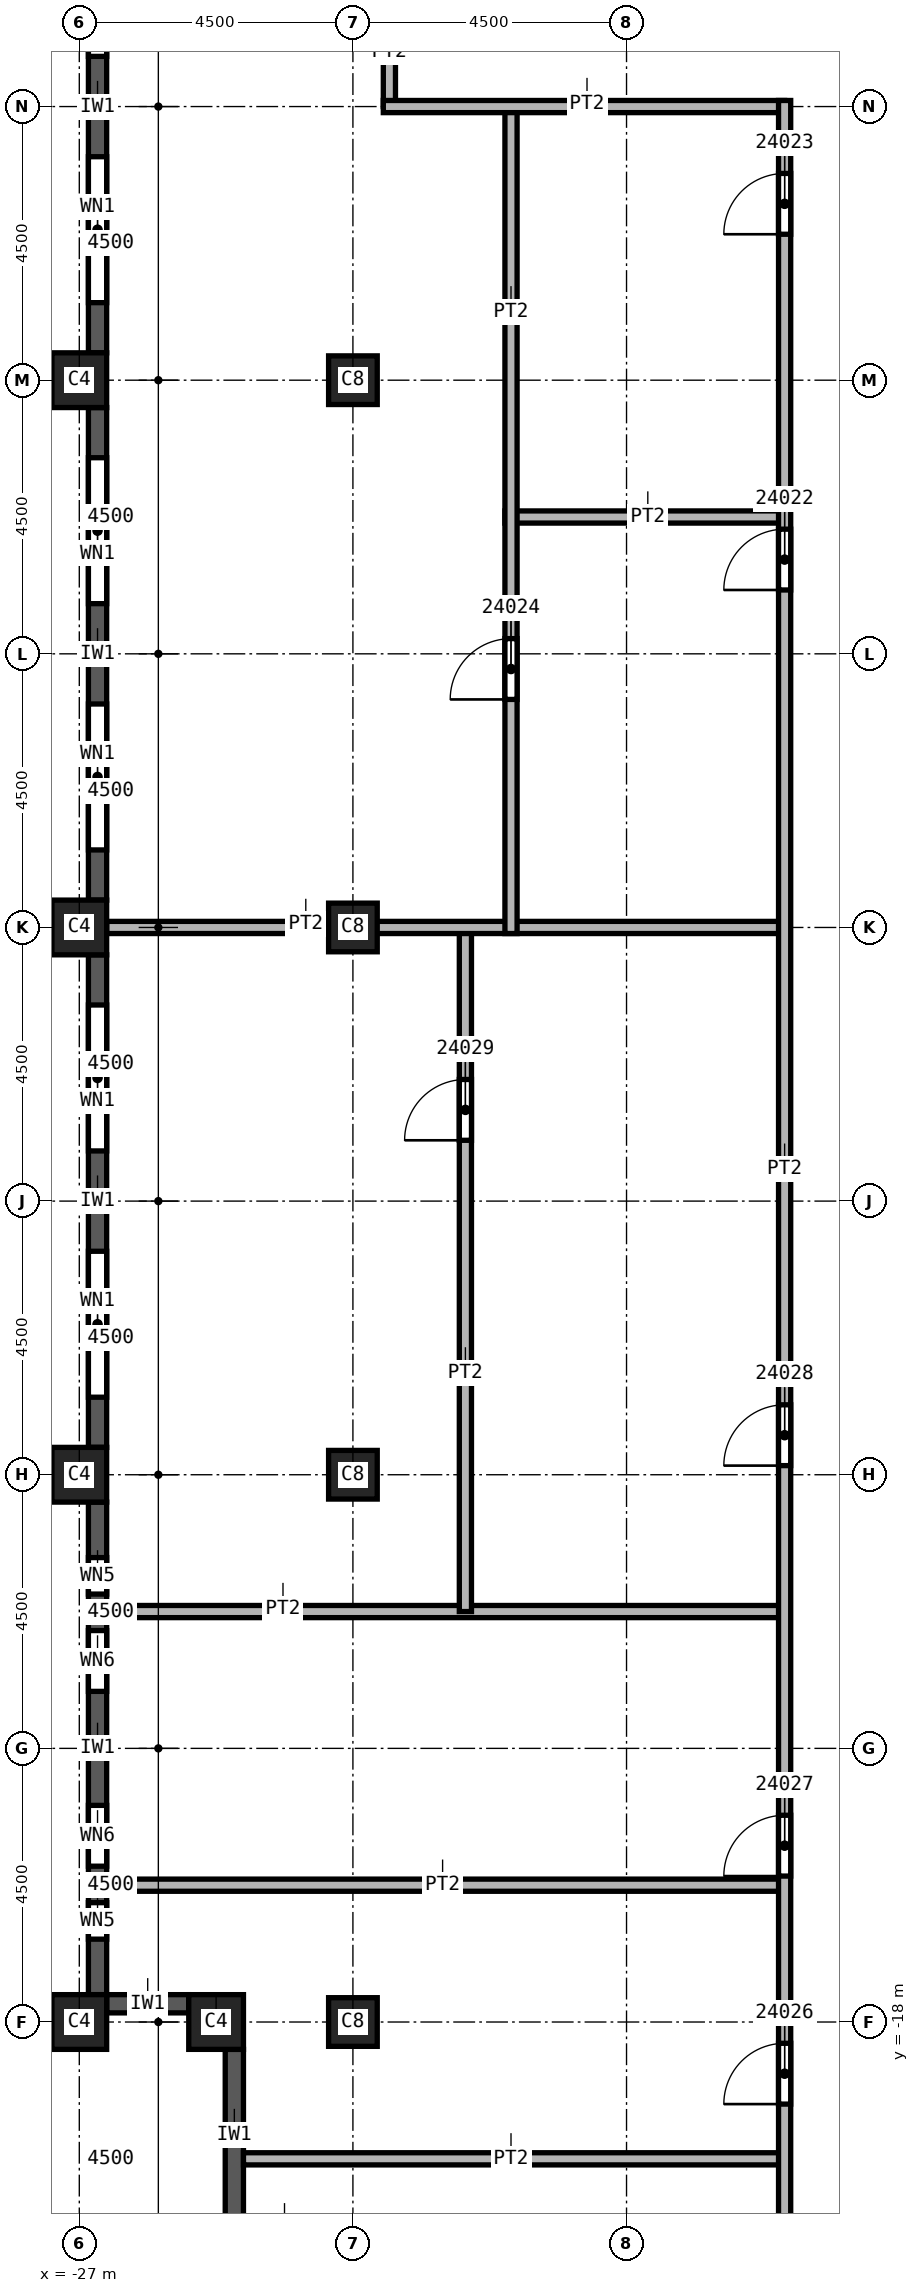
"""IFC4 building model, lengths in metres.
Left out: names, types, materials, properties, quantities, classifications, styles, units other than length and angle.
Written with IfcOpenShell. Run it as: python <this file> out.ifc"""

import sys

from ifc_helpers import new_model, si_unit, direction, frame, frame_2d, origin, origin_2d, place, context, subcontext, project, spatial, rectangle, extrude, element, fill, save


model = new_model("IFC4")
c1 = context("Model", 3, precision=1e-05, world=origin(), true_north=direction((0.0, 1.0)))
c2 = subcontext(c1, "Body", "Model", "MODEL_VIEW")
j1 = project(units=[si_unit("LENGTHUNIT", "METRE"), si_unit("PLANEANGLEUNIT", "RADIAN")], contexts=[c1])
p1 = place(None, origin())
s1 = spatial("IfcSite", under=j1, at=p1, CompositionType="ELEMENT")
p2 = place(p1, origin())
s2 = spatial("IfcBuilding", under=s1, at=p2, CompositionType="ELEMENT")
p3 = place(p2, frame((0.0, 0.0, 342.0)))
s3 = spatial("IfcBuildingStorey", under=s2, at=p3, CompositionType="ELEMENT", Elevation=342.0)
for number, where, z_axis, x_axis in (
    (1, (-22.5, 0.0, 0.0), (0.0, 0.0, 1.0), (1.0, 0.0, 0.0)),
    (2, (-22.5, 9.0, 0.0), (0.0, 0.0, 1.0), (1.0, 0.0, 0.0)),
    (3, (-22.5, -9.0, 0.0), (0.0, 0.0, 1.0), (1.0, 0.0, 0.0)),
    (4, (-22.5, -18.0, 0.0), (0.0, 0.0, 1.0), (1.0, 0.0, 0.0)),
):
    element("IfcColumn", number, at=place(p3, frame(where, z_axis=z_axis, x_axis=x_axis)), inside=s3, PredefinedType="COLUMN", context=c2, shape_type="SweptSolid", body=[
        extrude(rectangle(XDim=0.8, YDim=0.8, at=origin_2d()), origin(), (0.0, 0.0, 1.0), 3.74),
    ])
for number, where, z_axis, x_axis in (
    (5, (-27.0, 0.0, 0.0), (0.0, 0.0, 1.0), (0.0, 1.0, 0.0)),
    (6, (-27.0, 9.0, 0.0), (0.0, 0.0, 1.0), (0.0, 1.0, 0.0)),
    (7, (-27.0, -9.0, 0.0), (0.0, 0.0, 1.0), (0.0, 1.0, 0.0)),
    (8, (-27.0, -18.0, 0.0), (0.0, 0.0, 1.0), (0.0, 1.0, 0.0)),
    (9, (-24.75, -18.0, 0.0), (0.0, 0.0, 1.0), (1.0, 0.0, 0.0)),
):
    element("IfcColumn", number, at=place(p3, frame(where, z_axis=z_axis, x_axis=x_axis)), inside=s3, PredefinedType="COLUMN", context=c2, shape_type="SweptSolid", body=[
        extrude(rectangle(XDim=0.9, YDim=0.9, at=origin_2d()), origin(), (0.0, 0.0, 1.0), 3.74),
    ])
p4 = place(p3, frame((-26.7, 17.55, 0.0), z_axis=(0.0, 0.0, 1.0), x_axis=(0.0, -1.0, 0.0)))
e10 = element("IfcWall", 10, at=p4, inside=s3, PredefinedType="SOLIDWALL", context=c2, shape_type="SweptSolid", body=[
    extrude(rectangle(XDim=8.1, YDim=0.3, at=frame_2d((4.05, 0.0))), origin(), (0.0, 0.0, 1.0), 3.14),
])
p5 = place(p4, frame((0.825, 0.0, 0.8)))
e11 = element("IfcOpeningElement", 11, at=p5, cuts=e10, PredefinedType="OPENING", context=c2, shape_type="SweptSolid", body=[
    extrude(rectangle(XDim=2.4, YDim=1.95, at=frame_2d((1.2, 0.975))), frame((0.0, 0.15, 0.0), z_axis=(0.0, -1.0, 0.0), x_axis=(1.0, 0.0, 0.0)), (0.0, 0.0, 1.0), 0.3),
])
p6 = place(p4, frame((4.875, 0.0, 0.8)))
e12 = element("IfcOpeningElement", 12, at=p6, cuts=e10, PredefinedType="OPENING", context=c2, shape_type="SweptSolid", body=[
    extrude(rectangle(XDim=2.4, YDim=1.95, at=frame_2d((1.2, 0.975))), frame((0.0, 0.15, 0.0), z_axis=(0.0, -1.0, 0.0), x_axis=(1.0, 0.0, 0.0)), (0.0, 0.0, 1.0), 0.3),
])
p7 = place(p3, frame((-26.7, 8.55, 0.0), z_axis=(0.0, 0.0, 1.0), x_axis=(0.0, -1.0, 0.0)))
e13 = element("IfcWall", 13, at=p7, inside=s3, PredefinedType="SOLIDWALL", context=c2, shape_type="SweptSolid", body=[
    extrude(rectangle(XDim=8.1, YDim=0.3, at=frame_2d((4.05, 0.0))), origin(), (0.0, 0.0, 1.0), 3.14),
])
p8 = place(p7, frame((0.825, 0.0, 0.8)))
e14 = element("IfcOpeningElement", 14, at=p8, cuts=e13, PredefinedType="OPENING", context=c2, shape_type="SweptSolid", body=[
    extrude(rectangle(XDim=2.4, YDim=1.95, at=frame_2d((1.2, 0.975))), frame((0.0, 0.15, 0.0), z_axis=(0.0, -1.0, 0.0), x_axis=(1.0, 0.0, 0.0)), (0.0, 0.0, 1.0), 0.3),
])
p9 = place(p7, frame((4.875, 0.0, 0.8)))
e15 = element("IfcOpeningElement", 15, at=p9, cuts=e13, PredefinedType="OPENING", context=c2, shape_type="SweptSolid", body=[
    extrude(rectangle(XDim=2.4, YDim=1.95, at=frame_2d((1.2, 0.975))), frame((0.0, 0.15, 0.0), z_axis=(0.0, -1.0, 0.0), x_axis=(1.0, 0.0, 0.0)), (0.0, 0.0, 1.0), 0.3),
])
p10 = place(p3, frame((-26.7, -0.45, 0.0), z_axis=(0.0, 0.0, 1.0), x_axis=(0.0, -1.0, 0.0)))
e16 = element("IfcWall", 16, at=p10, inside=s3, PredefinedType="SOLIDWALL", context=c2, shape_type="SweptSolid", body=[
    extrude(rectangle(XDim=8.1, YDim=0.3, at=frame_2d((4.05, 0.0))), origin(), (0.0, 0.0, 1.0), 3.14),
])
p11 = place(p10, frame((0.825, 0.0, 0.8)))
e17 = element("IfcOpeningElement", 17, at=p11, cuts=e16, PredefinedType="OPENING", context=c2, shape_type="SweptSolid", body=[
    extrude(rectangle(XDim=2.4, YDim=1.95, at=frame_2d((1.2, 0.975))), frame((0.0, 0.15, 0.0), z_axis=(0.0, -1.0, 0.0), x_axis=(1.0, 0.0, 0.0)), (0.0, 0.0, 1.0), 0.3),
])
p12 = place(p10, frame((4.875, 0.0, 0.8)))
e18 = element("IfcOpeningElement", 18, at=p12, cuts=e16, PredefinedType="OPENING", context=c2, shape_type="SweptSolid", body=[
    extrude(rectangle(XDim=2.4, YDim=1.95, at=frame_2d((1.2, 0.975))), frame((0.0, 0.15, 0.0), z_axis=(0.0, -1.0, 0.0), x_axis=(1.0, 0.0, 0.0)), (0.0, 0.0, 1.0), 0.3),
])
p13 = place(p3, frame((-26.7, -9.45, 0.0), z_axis=(0.0, 0.0, 1.0), x_axis=(0.0, -1.0, 0.0)))
e19 = element("IfcWall", 19, at=p13, inside=s3, PredefinedType="SOLIDWALL", context=c2, shape_type="SweptSolid", body=[
    extrude(rectangle(XDim=8.1, YDim=0.3, at=frame_2d((4.05, 0.0))), origin(), (0.0, 0.0, 1.0), 3.14),
])
p14 = place(p13, frame((0.913, 0.0, 0.8)))
e20 = element("IfcOpeningElement", 20, at=p14, cuts=e19, PredefinedType="OPENING", context=c2, shape_type="SweptSolid", body=[
    extrude(rectangle(XDim=0.6, YDim=1.95, at=frame_2d((0.3, 0.975))), frame((0.0, 0.15, 0.0), z_axis=(0.0, -1.0, 0.0), x_axis=(1.0, 0.0, 0.0)), (0.0, 0.0, 1.0), 0.3),
])
p15 = place(p13, frame((2.113, 0.0, 0.8)))
e21 = element("IfcOpeningElement", 21, at=p15, cuts=e19, PredefinedType="OPENING", context=c2, shape_type="SweptSolid", body=[
    extrude(rectangle(XDim=1.0, YDim=1.95, at=frame_2d((0.5, 0.975))), frame((0.0, 0.15, 0.0), z_axis=(0.0, -1.0, 0.0), x_axis=(1.0, 0.0, 0.0)), (0.0, 0.0, 1.0), 0.3),
])
p16 = place(p13, frame((4.988, 0.0, 0.8)))
e22 = element("IfcOpeningElement", 22, at=p16, cuts=e19, PredefinedType="OPENING", context=c2, shape_type="SweptSolid", body=[
    extrude(rectangle(XDim=1.0, YDim=1.95, at=frame_2d((0.5, 0.975))), frame((0.0, 0.15, 0.0), z_axis=(0.0, -1.0, 0.0), x_axis=(1.0, 0.0, 0.0)), (0.0, 0.0, 1.0), 0.3),
])
p17 = place(p13, frame((6.587, 0.0, 0.8)))
e23 = element("IfcOpeningElement", 23, at=p17, cuts=e19, PredefinedType="OPENING", context=c2, shape_type="SweptSolid", body=[
    extrude(rectangle(XDim=0.6, YDim=1.95, at=frame_2d((0.3, 0.975))), frame((0.0, 0.15, 0.0), z_axis=(0.0, -1.0, 0.0), x_axis=(1.0, 0.0, 0.0)), (0.0, 0.0, 1.0), 0.3),
])
p18 = place(p3, frame((-26.55, -17.7, 0.0), z_axis=(0.0, 0.0, 1.0), x_axis=(1.0, 0.0, 0.0)))
e24 = element("IfcWall", 24, at=p18, inside=s3, PredefinedType="SOLIDWALL", context=c2, shape_type="SweptSolid", body=[
    extrude(rectangle(XDim=1.35, YDim=0.3, at=frame_2d((0.675, 0.0))), origin(), (0.0, 0.0, 1.0), 3.14),
])
p19 = place(p3, frame((-24.45, -18.45, 0.0), z_axis=(0.0, 0.0, 1.0), x_axis=(0.0, -1.0, 0.0)))
e25 = element("IfcWall", 25, at=p19, inside=s3, PredefinedType="SOLIDWALL", context=c2, shape_type="SweptSolid", body=[
    extrude(rectangle(XDim=2.8, YDim=0.3, at=frame_2d((1.4, 0.0))), origin(), (0.0, 0.0, 1.0), 3.14),
])
for number, where, z_axis, x_axis in (
    (26, (-26.55, -15.75, 0.0), (0.0, 0.0, 1.0), (1.0, 0.0, 0.0)),
    (27, (-26.55, -11.25, 0.0), (0.0, 0.0, 1.0), (1.0, 0.0, 0.0)),
):
    element("IfcWall", number, at=place(p3, frame(where, z_axis=z_axis, x_axis=x_axis)), inside=s3, PredefinedType="PARTITIONING", context=c2, shape_type="SweptSolid", body=[
        extrude(rectangle(XDim=11.15, YDim=0.2, at=frame_2d((5.575, 0.0))), origin(), (0.0, 0.0, 1.0), 3.74),
    ])
p20 = place(p3, frame((-24.3, -20.25, 0.0), z_axis=(0.0, 0.0, 1.0), x_axis=(1.0, 0.0, 0.0)))
e28 = element("IfcWall", 28, at=p20, inside=s3, PredefinedType="PARTITIONING", context=c2, shape_type="SweptSolid", body=[
    extrude(rectangle(XDim=8.9, YDim=0.2, at=frame_2d((4.45, 0.0))), origin(), (0.0, 0.0, 1.0), 3.74),
])
p21 = place(p3, frame((-21.9, 13.5, 0.0), z_axis=(0.0, 0.0, 1.0), x_axis=(0.0, 1.0, 0.0)))
e29 = element("IfcWall", 29, at=p21, inside=s3, PredefinedType="PARTITIONING", context=c2, shape_type="SweptSolid", body=[
    extrude(rectangle(XDim=1.7, YDim=0.2, at=frame_2d((0.85, 0.0))), origin(), (0.0, 0.0, 1.0), 3.74),
])
p22 = place(p3, frame((-20.65, -11.25, 0.0), z_axis=(0.0, 0.0, 1.0), x_axis=(0.0, 1.0, 0.0)))
e30 = element("IfcWall", 30, at=p22, inside=s3, PredefinedType="PARTITIONING", context=c2, shape_type="SweptSolid", body=[
    extrude(rectangle(XDim=11.25, YDim=0.2, at=frame_2d((5.625, 0.0))), origin(), (0.0, 0.0, 1.0), 3.74),
])
p23 = place(p22, frame((7.75, 0.0, 0.0)))
e31 = element("IfcOpeningElement", 31, at=p23, cuts=e30, PredefinedType="OPENING", context=c2, shape_type="SweptSolid", body=[
    extrude(rectangle(XDim=1.0, YDim=2.1, at=frame_2d((0.5, 1.05))), frame((0.0, 0.1, 0.0), z_axis=(0.0, -1.0, 0.0), x_axis=(1.0, 0.0, 0.0)), (0.0, 0.0, 1.0), 0.2),
])
p24 = place(p3, frame((-15.4, 0.0, 0.0), z_axis=(0.0, 0.0, 1.0), x_axis=(-1.0, 0.0, 0.0)))
e32 = element("IfcWall", 32, at=p24, inside=s3, PredefinedType="PARTITIONING", context=c2, shape_type="SweptSolid", body=[
    extrude(rectangle(XDim=11.15, YDim=0.2, at=frame_2d((5.575, 0.0))), origin(), (0.0, 0.0, 1.0), 3.74),
])
p25 = place(p3, frame((-20.0, 6.75, 0.0), z_axis=(0.0, 0.0, 1.0), x_axis=(1.0, 0.0, 0.0)))
e33 = element("IfcWall", 33, at=p25, inside=s3, PredefinedType="PARTITIONING", context=c2, shape_type="SweptSolid", body=[
    extrude(rectangle(XDim=4.6, YDim=0.2, at=frame_2d((2.3, 0.0))), origin(), (0.0, 0.0, 1.0), 3.74),
])
p26 = place(p3, frame((-19.9, -0.1, 0.0), z_axis=(0.0, 0.0, 1.0), x_axis=(0.0, 1.0, 0.0)))
e34 = element("IfcWall", 34, at=p26, inside=s3, PredefinedType="PARTITIONING", context=c2, shape_type="SweptSolid", body=[
    extrude(rectangle(XDim=13.6, YDim=0.2, at=frame_2d((6.8, 0.0))), origin(), (0.0, 0.0, 1.0), 3.74),
])
p27 = place(p26, frame((3.85, 0.0, 0.0)))
e35 = element("IfcOpeningElement", 35, at=p27, cuts=e34, PredefinedType="OPENING", context=c2, shape_type="SweptSolid", body=[
    extrude(rectangle(XDim=1.0, YDim=2.1, at=frame_2d((0.5, 1.05))), frame((0.0, 0.1, 0.0), z_axis=(0.0, -1.0, 0.0), x_axis=(1.0, 0.0, 0.0)), (0.0, 0.0, 1.0), 0.2),
])
p28 = place(p3, frame((-15.4, 13.5, 0.0), z_axis=(0.0, 0.0, 1.0), x_axis=(-1.0, 0.0, 0.0)))
e36 = element("IfcWall", 36, at=p28, inside=s3, PredefinedType="PARTITIONING", context=c2, shape_type="SweptSolid", body=[
    extrude(rectangle(XDim=6.6, YDim=0.2, at=frame_2d((3.3, 0.0))), origin(), (0.0, 0.0, 1.0), 3.74),
])
p29 = place(p3, frame((-15.4, -24.95, 0.0), z_axis=(0.0, 0.0, 1.0), x_axis=(0.0, 1.0, 0.0)))
e37 = element("IfcWall", 37, at=p29, inside=s3, PredefinedType="PARTITIONING", context=c2, shape_type="SweptSolid", body=[
    extrude(rectangle(XDim=38.55, YDim=0.2, at=frame_2d((19.275, 0.0))), origin(), (0.0, 0.0, 1.0), 3.74),
])
p30 = place(p29, frame((30.5, 0.0, 0.0)))
e38 = element("IfcOpeningElement", 38, at=p30, cuts=e37, PredefinedType="OPENING", context=c2, shape_type="SweptSolid", body=[
    extrude(rectangle(XDim=1.0, YDim=2.1, at=frame_2d((0.5, 1.05))), frame((0.0, 0.1, 0.0), z_axis=(0.0, -1.0, 0.0), x_axis=(1.0, 0.0, 0.0)), (0.0, 0.0, 1.0), 0.2),
])
p31 = place(p29, frame((36.35, 0.0, 0.0)))
e39 = element("IfcOpeningElement", 39, at=p31, cuts=e37, PredefinedType="OPENING", context=c2, shape_type="SweptSolid", body=[
    extrude(rectangle(XDim=1.0, YDim=2.1, at=frame_2d((0.5, 1.05))), frame((0.0, 0.1, 0.0), z_axis=(0.0, -1.0, 0.0), x_axis=(1.0, 0.0, 0.0)), (0.0, 0.0, 1.0), 0.2),
])
p32 = place(p29, frame((1.9, 0.0, 0.0)))
e40 = element("IfcOpeningElement", 40, at=p32, cuts=e37, PredefinedType="OPENING", context=c2, shape_type="SweptSolid", body=[
    extrude(rectangle(XDim=1.0, YDim=2.1, at=frame_2d((0.5, 1.05))), frame((0.0, 0.1, 0.0), z_axis=(0.0, -1.0, 0.0), x_axis=(1.0, 0.0, 0.0)), (0.0, 0.0, 1.0), 0.2),
])
p33 = place(p29, frame((5.6, 0.0, 0.0)))
e41 = element("IfcOpeningElement", 41, at=p33, cuts=e37, PredefinedType="OPENING", context=c2, shape_type="SweptSolid", body=[
    extrude(rectangle(XDim=1.0, YDim=2.1, at=frame_2d((0.5, 1.05))), frame((0.0, 0.1, 0.0), z_axis=(0.0, -1.0, 0.0), x_axis=(1.0, 0.0, 0.0)), (0.0, 0.0, 1.0), 0.2),
])
p34 = place(p29, frame((9.35, 0.0, 0.0)))
e42 = element("IfcOpeningElement", 42, at=p34, cuts=e37, PredefinedType="OPENING", context=c2, shape_type="SweptSolid", body=[
    extrude(rectangle(XDim=1.0, YDim=2.1, at=frame_2d((0.5, 1.05))), frame((0.0, 0.1, 0.0), z_axis=(0.0, -1.0, 0.0), x_axis=(1.0, 0.0, 0.0)), (0.0, 0.0, 1.0), 0.2),
])
p35 = place(p29, frame((16.1, 0.0, 0.0)))
e43 = element("IfcOpeningElement", 43, at=p35, cuts=e37, PredefinedType="OPENING", context=c2, shape_type="SweptSolid", body=[
    extrude(rectangle(XDim=1.0, YDim=2.1, at=frame_2d((0.5, 1.05))), frame((0.0, 0.1, 0.0), z_axis=(0.0, -1.0, 0.0), x_axis=(1.0, 0.0, 0.0)), (0.0, 0.0, 1.0), 0.2),
])
p36 = place(p5, origin())
e44 = element("IfcWindow", 44, at=p36, inside=s3, PartitioningType="SINGLE_PANEL", PredefinedType="WINDOW", context=c2, shape_type="SweptSolid", body=[
    extrude(rectangle(XDim=2.4, YDim=1.95, at=frame_2d((1.2, 0.975))), frame((0.0, 0.03, 0.0), z_axis=(0.0, -1.0, 0.0), x_axis=(1.0, 0.0, 0.0)), (0.0, 0.0, 1.0), 0.06),
])
fill(e11, e44)
p37 = place(p6, origin())
e45 = element("IfcWindow", 45, at=p37, inside=s3, PartitioningType="SINGLE_PANEL", PredefinedType="WINDOW", context=c2, shape_type="SweptSolid", body=[
    extrude(rectangle(XDim=2.4, YDim=1.95, at=frame_2d((1.2, 0.975))), frame((0.0, 0.03, 0.0), z_axis=(0.0, -1.0, 0.0), x_axis=(1.0, 0.0, 0.0)), (0.0, 0.0, 1.0), 0.06),
])
fill(e12, e45)
p38 = place(p8, origin())
e46 = element("IfcWindow", 46, at=p38, inside=s3, PartitioningType="SINGLE_PANEL", PredefinedType="WINDOW", context=c2, shape_type="SweptSolid", body=[
    extrude(rectangle(XDim=2.4, YDim=1.95, at=frame_2d((1.2, 0.975))), frame((0.0, 0.03, 0.0), z_axis=(0.0, -1.0, 0.0), x_axis=(1.0, 0.0, 0.0)), (0.0, 0.0, 1.0), 0.06),
])
fill(e14, e46)
p39 = place(p9, origin())
e47 = element("IfcWindow", 47, at=p39, inside=s3, PartitioningType="SINGLE_PANEL", PredefinedType="WINDOW", context=c2, shape_type="SweptSolid", body=[
    extrude(rectangle(XDim=2.4, YDim=1.95, at=frame_2d((1.2, 0.975))), frame((0.0, 0.03, 0.0), z_axis=(0.0, -1.0, 0.0), x_axis=(1.0, 0.0, 0.0)), (0.0, 0.0, 1.0), 0.06),
])
fill(e15, e47)
p40 = place(p11, origin())
e48 = element("IfcWindow", 48, at=p40, inside=s3, PartitioningType="SINGLE_PANEL", PredefinedType="WINDOW", context=c2, shape_type="SweptSolid", body=[
    extrude(rectangle(XDim=2.4, YDim=1.95, at=frame_2d((1.2, 0.975))), frame((0.0, 0.03, 0.0), z_axis=(0.0, -1.0, 0.0), x_axis=(1.0, 0.0, 0.0)), (0.0, 0.0, 1.0), 0.06),
])
fill(e17, e48)
p41 = place(p12, origin())
e49 = element("IfcWindow", 49, at=p41, inside=s3, PartitioningType="SINGLE_PANEL", PredefinedType="WINDOW", context=c2, shape_type="SweptSolid", body=[
    extrude(rectangle(XDim=2.4, YDim=1.95, at=frame_2d((1.2, 0.975))), frame((0.0, 0.03, 0.0), z_axis=(0.0, -1.0, 0.0), x_axis=(1.0, 0.0, 0.0)), (0.0, 0.0, 1.0), 0.06),
])
fill(e18, e49)
p42 = place(p30, origin())
e50 = element("IfcDoor", 50, at=p42, inside=s3, OperationType="SINGLE_SWING_LEFT", PredefinedType="DOOR", context=c2, shape_type="SweptSolid", body=[
    extrude(rectangle(XDim=1.0, YDim=2.1, at=frame_2d((0.5, 1.05))), frame((0.0, 0.025, 0.0), z_axis=(0.0, -1.0, 0.0), x_axis=(1.0, 0.0, 0.0)), (0.0, 0.0, 1.0), 0.05),
])
fill(e38, e50)
p43 = place(p31, origin())
e51 = element("IfcDoor", 51, at=p43, inside=s3, OperationType="SINGLE_SWING_RIGHT", PredefinedType="DOOR", context=c2, shape_type="SweptSolid", body=[
    extrude(rectangle(XDim=1.0, YDim=2.1, at=frame_2d((0.5, 1.05))), frame((0.0, 0.025, 0.0), z_axis=(0.0, -1.0, 0.0), x_axis=(1.0, 0.0, 0.0)), (0.0, 0.0, 1.0), 0.05),
])
fill(e39, e51)
p44 = place(p27, origin())
e52 = element("IfcDoor", 52, at=p44, inside=s3, OperationType="SINGLE_SWING_LEFT", PredefinedType="DOOR", context=c2, shape_type="SweptSolid", body=[
    extrude(rectangle(XDim=1.0, YDim=2.1, at=frame_2d((0.5, 1.05))), frame((0.0, 0.025, 0.0), z_axis=(0.0, -1.0, 0.0), x_axis=(1.0, 0.0, 0.0)), (0.0, 0.0, 1.0), 0.05),
])
fill(e35, e52)
p45 = place(p33, origin())
e53 = element("IfcDoor", 53, at=p45, inside=s3, OperationType="SINGLE_SWING_LEFT", PredefinedType="DOOR", context=c2, shape_type="SweptSolid", body=[
    extrude(rectangle(XDim=1.0, YDim=2.1, at=frame_2d((0.5, 1.05))), frame((0.0, 0.025, 0.0), z_axis=(0.0, -1.0, 0.0), x_axis=(1.0, 0.0, 0.0)), (0.0, 0.0, 1.0), 0.05),
])
fill(e41, e53)
p46 = place(p34, origin())
e54 = element("IfcDoor", 54, at=p46, inside=s3, OperationType="SINGLE_SWING_RIGHT", PredefinedType="DOOR", context=c2, shape_type="SweptSolid", body=[
    extrude(rectangle(XDim=1.0, YDim=2.1, at=frame_2d((0.5, 1.05))), frame((0.0, 0.025, 0.0), z_axis=(0.0, -1.0, 0.0), x_axis=(1.0, 0.0, 0.0)), (0.0, 0.0, 1.0), 0.05),
])
fill(e42, e54)
p47 = place(p35, origin())
e55 = element("IfcDoor", 55, at=p47, inside=s3, OperationType="SINGLE_SWING_LEFT", PredefinedType="DOOR", context=c2, shape_type="SweptSolid", body=[
    extrude(rectangle(XDim=1.0, YDim=2.1, at=frame_2d((0.5, 1.05))), frame((0.0, 0.025, 0.0), z_axis=(0.0, -1.0, 0.0), x_axis=(1.0, 0.0, 0.0)), (0.0, 0.0, 1.0), 0.05),
])
fill(e43, e55)
p48 = place(p23, origin())
e56 = element("IfcDoor", 56, at=p48, inside=s3, OperationType="SINGLE_SWING_RIGHT", PredefinedType="DOOR", context=c2, shape_type="SweptSolid", body=[
    extrude(rectangle(XDim=1.0, YDim=2.1, at=frame_2d((0.5, 1.05))), frame((0.0, 0.025, 0.0), z_axis=(0.0, -1.0, 0.0), x_axis=(1.0, 0.0, 0.0)), (0.0, 0.0, 1.0), 0.05),
])
fill(e31, e56)
p49 = place(p14, origin())
e57 = element("IfcWindow", 57, at=p49, inside=s3, PartitioningType="SINGLE_PANEL", PredefinedType="WINDOW", context=c2, shape_type="SweptSolid", body=[
    extrude(rectangle(XDim=0.6, YDim=1.95, at=frame_2d((0.3, 0.975))), frame((0.0, 0.03, 0.0), z_axis=(0.0, -1.0, 0.0), x_axis=(1.0, 0.0, 0.0)), (0.0, 0.0, 1.0), 0.06),
])
fill(e20, e57)
p50 = place(p15, origin())
e58 = element("IfcWindow", 58, at=p50, inside=s3, PartitioningType="SINGLE_PANEL", PredefinedType="WINDOW", context=c2, shape_type="SweptSolid", body=[
    extrude(rectangle(XDim=1.0, YDim=1.95, at=frame_2d((0.5, 0.975))), frame((0.0, 0.03, 0.0), z_axis=(0.0, -1.0, 0.0), x_axis=(1.0, 0.0, 0.0)), (0.0, 0.0, 1.0), 0.06),
])
fill(e21, e58)
p51 = place(p16, origin())
e59 = element("IfcWindow", 59, at=p51, inside=s3, PartitioningType="SINGLE_PANEL", PredefinedType="WINDOW", context=c2, shape_type="SweptSolid", body=[
    extrude(rectangle(XDim=1.0, YDim=1.95, at=frame_2d((0.5, 0.975))), frame((0.0, 0.03, 0.0), z_axis=(0.0, -1.0, 0.0), x_axis=(1.0, 0.0, 0.0)), (0.0, 0.0, 1.0), 0.06),
])
fill(e22, e59)
p52 = place(p17, origin())
e60 = element("IfcWindow", 60, at=p52, inside=s3, PartitioningType="SINGLE_PANEL", PredefinedType="WINDOW", context=c2, shape_type="SweptSolid", body=[
    extrude(rectangle(XDim=0.6, YDim=1.95, at=frame_2d((0.3, 0.975))), frame((0.0, 0.03, 0.0), z_axis=(0.0, -1.0, 0.0), x_axis=(1.0, 0.0, 0.0)), (0.0, 0.0, 1.0), 0.06),
])
fill(e23, e60)
save(model, sys.argv[1])
